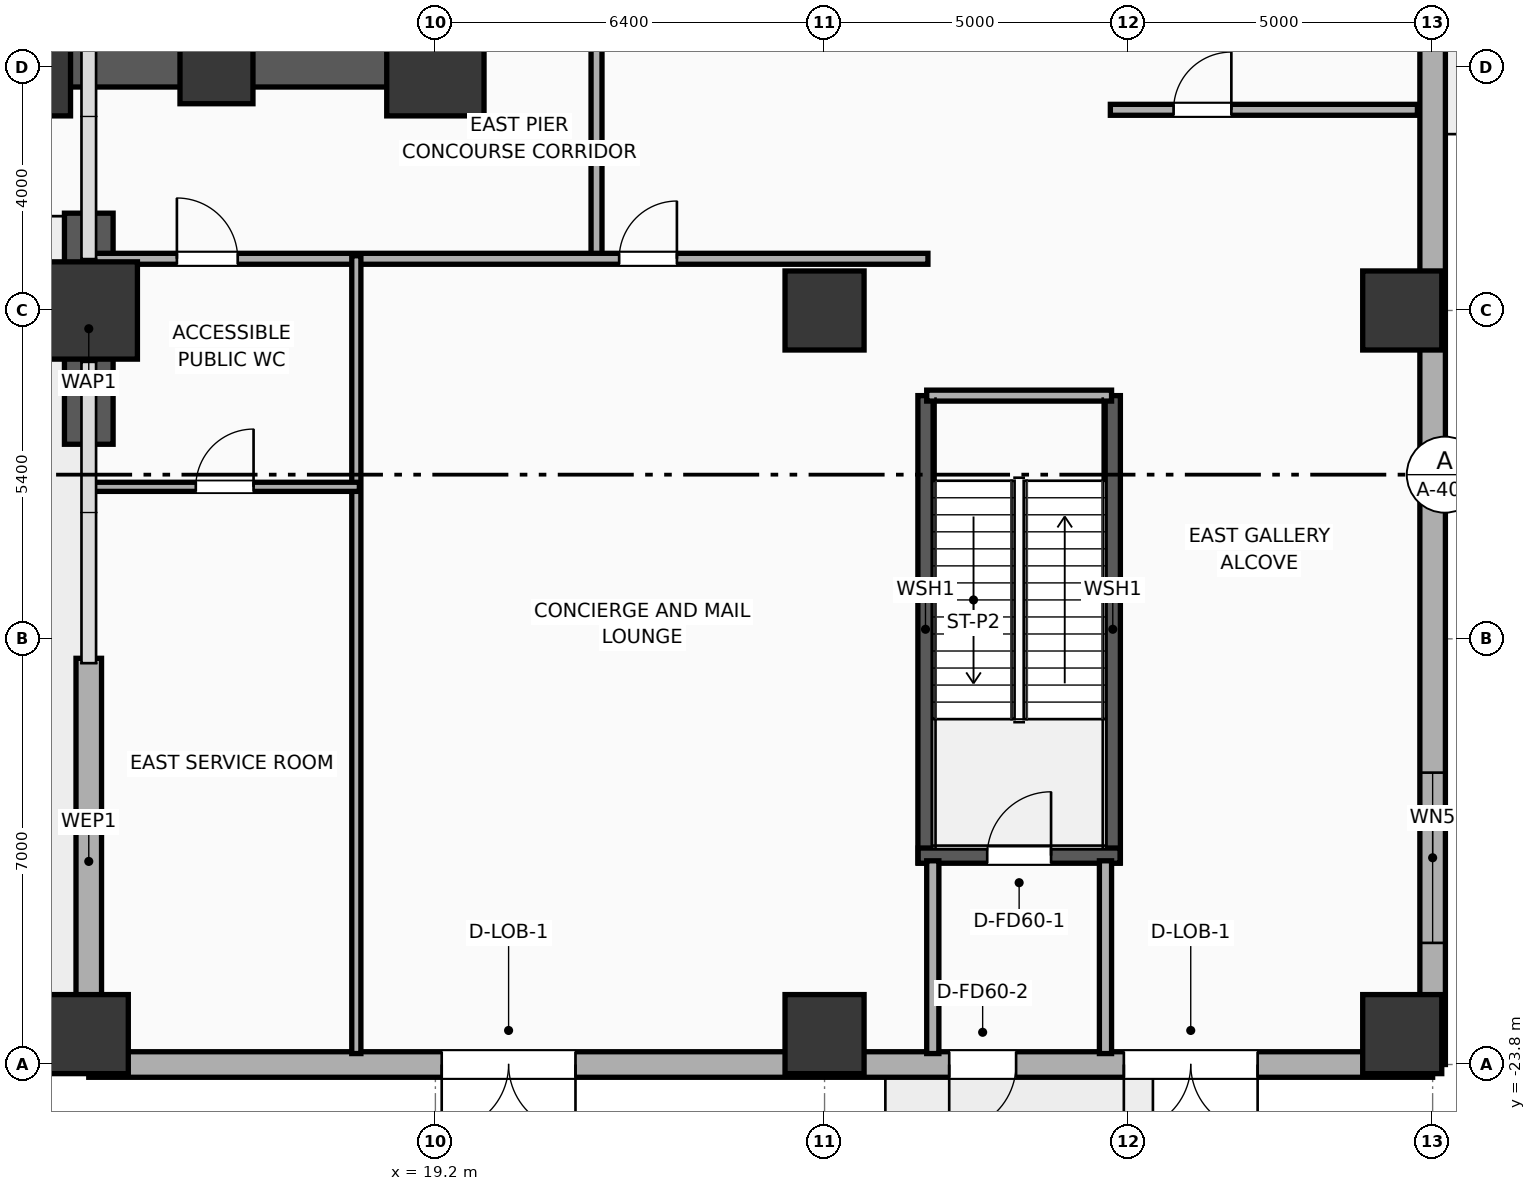
"""IFC4 building model, lengths in metres.
Left out: names, types, materials, properties, quantities, classifications, styles, units other than length and angle.
Written with IfcOpenShell. Run it as: python <this file> out.ifc"""

import sys

from ifc_helpers import new_model, si_unit, direction, frame, frame_2d, origin, origin_2d, place, context, subcontext, project, spatial, rectangle, extrude, element, fill, save


model = new_model("IFC4")
c1 = context("Model", 3, precision=1e-05, world=origin(), true_north=direction((0.0, 1.0)))
c2 = subcontext(c1, "Body", "Model", "MODEL_VIEW")
j1 = project(units=[si_unit("LENGTHUNIT", "METRE"), si_unit("PLANEANGLEUNIT", "RADIAN")], contexts=[c1])
p1 = place(None, origin())
s1 = spatial("IfcSite", under=j1, at=p1, CompositionType="ELEMENT")
p2 = place(p1, origin())
s2 = spatial("IfcBuilding", under=s1, at=p2, CompositionType="ELEMENT")
p3 = place(p2, origin())
s3 = spatial("IfcBuildingStorey", under=s2, at=p3, CompositionType="ELEMENT", Elevation=0.0)
p4 = place(p3, frame((12.4, -7.4, 0.0), z_axis=(0.0, 0.0, 1.0), x_axis=(1.0, 0.0, 0.0)))
e1 = element("IfcColumn", 1, at=p4, inside=s3, PredefinedType="COLUMN", context=c2, shape_type="SweptSolid", body=[
    extrude(rectangle(XDim=1.6, YDim=1.6, at=origin_2d()), origin(), (0.0, 0.0, 1.0), 5.2),
])
p5 = place(p3, frame((15.6, -7.4, 0.0), z_axis=(0.0, 0.0, 1.0), x_axis=(1.0, 0.0, 0.0)))
e2 = element("IfcColumn", 2, at=p5, inside=s3, PredefinedType="COLUMN", context=c2, shape_type="SweptSolid", body=[
    extrude(rectangle(XDim=1.2, YDim=1.2, at=origin_2d()), origin(), (0.0, 0.0, 1.0), 5.2),
])
p6 = place(p3, frame((19.2, -7.4, 0.0), z_axis=(0.0, 0.0, 1.0), x_axis=(1.0, 0.0, 0.0)))
e3 = element("IfcColumn", 3, at=p6, inside=s3, PredefinedType="COLUMN", context=c2, shape_type="SweptSolid", body=[
    extrude(rectangle(XDim=1.6, YDim=1.6, at=origin_2d()), origin(), (0.0, 0.0, 1.0), 5.2),
])
p7 = place(p3, frame((12.075, -7.4, 0.0), z_axis=(0.0, 0.0, 1.0), x_axis=(1.0, 0.0, 0.0)))
e4 = element("IfcWall", 4, at=p7, inside=s3, PredefinedType="SHEAR", context=c2, shape_type="SweptSolid", body=[
    extrude(rectangle(XDim=7.45, YDim=0.65, at=frame_2d((3.725, 0.0))), origin(), (0.0, 0.0, 1.0), 4.92),
])
p8 = place(p3, frame((19.145, -7.4, 0.0), z_axis=(0.0, 0.0, 1.0), x_axis=(0.0, 1.0, 0.0)))
e5 = element("IfcWall", 5, at=p8, inside=s3, PredefinedType="SHEAR", context=c2, shape_type="SweptSolid", body=[
    extrude(rectangle(XDim=14.8, YDim=0.65, at=frame_2d((7.4, 0.0))), origin(), (0.0, 0.0, 1.0), 4.92),
])
for number, where, z_axis, x_axis in (
    (6, (27.26, -20.485, 0.0), (0.0, 0.0, 1.0), (0.0, 1.0, 0.0)),
    (7, (30.34, -20.485, 0.0), (0.0, 0.0, 1.0), (0.0, 1.0, 0.0)),
):
    element("IfcWall", number, at=place(p3, frame(where, z_axis=z_axis, x_axis=x_axis)), inside=s3, PredefinedType="SOLIDWALL", context=c2, shape_type="SweptSolid", body=[
        extrude(rectangle(XDim=7.685, YDim=0.25, at=frame_2d((3.843, 0.0))), origin(), (0.0, 0.0, 1.0), 4.92),
    ])
p9 = place(p3, frame((27.14, -20.365, 0.0), z_axis=(0.0, 0.0, 1.0), x_axis=(1.0, 0.0, 0.0)))
e8 = element("IfcWall", 8, at=p9, inside=s3, PredefinedType="SOLIDWALL", context=c2, shape_type="SweptSolid", body=[
    extrude(rectangle(XDim=3.32, YDim=0.25, at=frame_2d((1.66, 0.0))), origin(), (0.0, 0.0, 1.0), 4.92),
])
p10 = place(p9, frame((1.135, 0.0, 0.0)))
e9 = element("IfcOpeningElement", 9, at=p10, cuts=e8, PredefinedType="OPENING", context=c2, shape_type="SweptSolid", body=[
    extrude(rectangle(XDim=1.05, YDim=2.05, at=frame_2d((0.525, 1.025))), frame((0.0, 0.135, 0.0), z_axis=(0.0, -1.0, 0.0), x_axis=(1.0, 0.0, 0.0)), (0.0, 0.0, 1.0), 0.27),
])
p11 = place(p3, frame((13.5, -23.3, 0.0), z_axis=(0.0, 0.0, 1.0), x_axis=(1.0, 0.0, 0.0)))
e10 = element("IfcColumn", 10, at=p11, inside=s3, PredefinedType="COLUMN", context=c2, shape_type="SweptSolid", body=[
    extrude(rectangle(XDim=1.3, YDim=1.3, at=origin_2d()), origin(), (0.0, 0.0, 1.0), 5.2),
])
p12 = place(p3, frame((13.5, -11.4, 0.0), z_axis=(0.0, 0.0, 1.0), x_axis=(1.0, 0.0, 0.0)))
e11 = element("IfcColumn", 11, at=p12, inside=s3, PredefinedType="COLUMN", context=c2, shape_type="SweptSolid", body=[
    extrude(rectangle(XDim=1.6, YDim=1.6, at=origin_2d()), origin(), (0.0, 0.0, 1.0), 5.2),
])
for number, where, z_axis, x_axis in (
    (12, (25.6, -23.3, 0.0), (0.0, 0.0, 1.0), (1.0, 0.0, 0.0)),
    (13, (25.6, -11.4, 0.0), (0.0, 0.0, 1.0), (1.0, 0.0, 0.0)),
    (14, (35.1, -23.3, 0.0), (0.0, 0.0, 1.0), (1.0, 0.0, 0.0)),
    (15, (35.1, -11.4, 0.0), (0.0, 0.0, 1.0), (1.0, 0.0, 0.0)),
):
    element("IfcColumn", number, at=place(p3, frame(where, z_axis=z_axis, x_axis=x_axis)), inside=s3, PredefinedType="COLUMN", context=c2, shape_type="SweptSolid", body=[
        extrude(rectangle(XDim=1.3, YDim=1.3, at=origin_2d()), origin(), (0.0, 0.0, 1.0), 5.2),
    ])
p13 = place(p3, frame((13.5, -13.6, 0.0), z_axis=(0.0, 0.0, 1.0), x_axis=(0.0, 1.0, 0.0)))
e16 = element("IfcWall", 16, at=p13, inside=s3, PredefinedType="SOLIDWALL", context=c2, shape_type="SweptSolid", body=[
    extrude(rectangle(XDim=3.8, YDim=0.8, at=frame_2d((1.9, 0.0))), origin(), (0.0, 0.0, 1.0), 4.92),
])
p14 = place(p3, frame((35.6, -23.8, 0.0), z_axis=(0.0, 0.0, 1.0), x_axis=(-1.0, 0.0, 0.0)))
e17 = element("IfcWall", 17, at=p14, inside=s3, PredefinedType="ELEMENTEDWALL", context=c2, shape_type="SweptSolid", body=[
    extrude(rectangle(XDim=22.1, YDim=0.42, at=frame_2d((11.05, 0.0))), origin(), (0.0, 0.0, 1.0), 4.92),
])
p15 = place(p14, frame((6.85, 0.0, 0.0)))
e18 = element("IfcOpeningElement", 18, at=p15, cuts=e17, PredefinedType="OPENING", context=c2, shape_type="SweptSolid", body=[
    extrude(rectangle(XDim=1.1, YDim=2.05, at=frame_2d((0.55, 1.025))), frame((0.0, 0.22, 0.0), z_axis=(0.0, -1.0, 0.0), x_axis=(1.0, 0.0, 0.0)), (0.0, 0.0, 1.0), 0.44),
])
p16 = place(p14, frame((2.878, 0.0, 0.0)))
e19 = element("IfcOpeningElement", 19, at=p16, cuts=e17, PredefinedType="OPENING", context=c2, shape_type="SweptSolid", body=[
    extrude(rectangle(XDim=2.2, YDim=2.4, at=frame_2d((1.1, 1.2))), frame((0.0, 0.22, 0.0), z_axis=(0.0, -1.0, 0.0), x_axis=(1.0, 0.0, 0.0)), (0.0, 0.0, 1.0), 0.44),
])
p17 = place(p14, frame((14.096, 0.0, 0.0)))
e20 = element("IfcOpeningElement", 20, at=p17, cuts=e17, PredefinedType="OPENING", context=c2, shape_type="SweptSolid", body=[
    extrude(rectangle(XDim=2.2, YDim=2.4, at=frame_2d((1.1, 1.2))), frame((0.0, 0.22, 0.0), z_axis=(0.0, -1.0, 0.0), x_axis=(1.0, 0.0, 0.0)), (0.0, 0.0, 1.0), 0.44),
])
p18 = place(p3, frame((35.6, -23.8, 0.0), z_axis=(0.0, 0.0, 1.0), x_axis=(0.0, 1.0, 0.0)))
e21 = element("IfcWall", 21, at=p18, inside=s3, PredefinedType="ELEMENTEDWALL", context=c2, shape_type="SweptSolid", body=[
    extrude(rectangle(XDim=47.6, YDim=0.42, at=frame_2d((23.8, 0.0))), origin(), (0.0, 0.0, 1.0), 4.92),
])
p19 = place(p18, frame((2.0, 0.0, 0.65)))
e22 = element("IfcOpeningElement", 22, at=p19, cuts=e21, PredefinedType="OPENING", context=c2, shape_type="SweptSolid", body=[
    extrude(rectangle(XDim=2.8, YDim=2.6, at=frame_2d((1.4, 1.3))), frame((0.0, 0.22, 0.0), z_axis=(0.0, -1.0, 0.0), x_axis=(1.0, 0.0, 0.0)), (0.0, 0.0, 1.0), 0.44),
])
p20 = place(p18, frame((29.2, 0.0, 0.65)))
e23 = element("IfcOpeningElement", 23, at=p20, cuts=e21, PredefinedType="OPENING", context=c2, shape_type="SweptSolid", body=[
    extrude(rectangle(XDim=2.8, YDim=2.6, at=frame_2d((1.4, 1.3))), frame((0.0, 0.22, 0.0), z_axis=(0.0, -1.0, 0.0), x_axis=(1.0, 0.0, 0.0)), (0.0, 0.0, 1.0), 0.44),
])
p21 = place(p18, frame((42.8, 0.0, 0.65)))
e24 = element("IfcOpeningElement", 24, at=p21, cuts=e21, PredefinedType="OPENING", context=c2, shape_type="SweptSolid", body=[
    extrude(rectangle(XDim=2.8, YDim=2.6, at=frame_2d((1.4, 1.3))), frame((0.0, 0.22, 0.0), z_axis=(0.0, -1.0, 0.0), x_axis=(1.0, 0.0, 0.0)), (0.0, 0.0, 1.0), 0.44),
])
p22 = place(p3, frame((13.5, -23.8, 0.0), z_axis=(0.0, 0.0, 1.0), x_axis=(0.0, 1.0, 0.0)))
e25 = element("IfcWall", 25, at=p22, inside=s3, PredefinedType="ELEMENTEDWALL", context=c2, shape_type="SweptSolid", body=[
    extrude(rectangle(XDim=6.68, YDim=0.42, at=frame_2d((3.34, 0.0))), origin(), (0.0, 0.0, 1.0), 4.21),
])
p23 = place(p3, frame((15.4, -7.4, 0.0), z_axis=(0.0, 0.0, 1.0), x_axis=(0.0, 1.0, 0.0)))
e26 = element("IfcWall", 26, at=p23, inside=s3, PredefinedType="SOLIDWALL", context=c2, shape_type="SweptSolid", body=[
    extrude(rectangle(XDim=2.6, YDim=0.25, at=frame_2d((1.3, 0.0))), origin(), (0.0, 0.0, 1.0), 4.92),
])
for number, where, z_axis, x_axis in (
    (27, (27.38, -23.62, 0.0), (0.0, 0.0, 1.0), (0.0, 1.0, 0.0)),
    (28, (30.22, -23.62, 0.0), (0.0, 0.0, 1.0), (0.0, 1.0, 0.0)),
):
    element("IfcWall", number, at=place(p3, frame(where, z_axis=z_axis, x_axis=x_axis)), inside=s3, PredefinedType="PARTITIONING", context=c2, shape_type="SweptSolid", body=[
        extrude(rectangle(XDim=3.17, YDim=0.2, at=frame_2d((1.585, 0.0))), origin(), (0.0, 0.0, 1.0), 4.92),
    ])
p24 = place(p3, frame((27.28, -12.8, 0.0), z_axis=(0.0, 0.0, 1.0), x_axis=(1.0, 0.0, 0.0)))
e29 = element("IfcWall", 29, at=p24, inside=s3, PredefinedType="PARTITIONING", context=c2, shape_type="SweptSolid", body=[
    extrude(rectangle(XDim=3.04, YDim=0.18, at=frame_2d((1.52, 0.0))), origin(), (0.0, 0.0, 1.0), 4.92),
])
p25 = place(p3, frame((21.85, -10.5, 0.0), z_axis=(0.0, 0.0, 1.0), x_axis=(0.0, 1.0, 0.0)))
e30 = element("IfcWall", 30, at=p25, inside=s3, PredefinedType="PARTITIONING", context=c2, shape_type="SweptSolid", body=[
    extrude(rectangle(XDim=34.12, YDim=0.18, at=frame_2d((17.06, 0.0))), origin(), (0.0, 0.0, 1.0), 4.92),
])
p26 = place(p25, frame((13.531, 0.0, 0.0)))
e31 = element("IfcOpeningElement", 31, at=p26, cuts=e30, PredefinedType="OPENING", context=c2, shape_type="SweptSolid", body=[
    extrude(rectangle(XDim=1.6, YDim=2.05, at=frame_2d((0.8, 1.025))), frame((0.0, 0.1, 0.0), z_axis=(0.0, -1.0, 0.0), x_axis=(1.0, 0.0, 0.0)), (0.0, 0.0, 1.0), 0.2),
])
p27 = place(p3, frame((30.3, -8.1, 0.0), z_axis=(0.0, 0.0, 1.0), x_axis=(1.0, 0.0, 0.0)))
e32 = element("IfcWall", 32, at=p27, inside=s3, PredefinedType="PARTITIONING", context=c2, shape_type="SweptSolid", body=[
    extrude(rectangle(XDim=5.05, YDim=0.18, at=frame_2d((2.525, 0.0))), origin(), (0.0, 0.0, 1.0), 4.92),
])
p28 = place(p27, frame((1.04, 0.0, 0.0)))
e33 = element("IfcOpeningElement", 33, at=p28, cuts=e32, PredefinedType="OPENING", context=c2, shape_type="SweptSolid", body=[
    extrude(rectangle(XDim=0.95, YDim=2.05, at=frame_2d((0.475, 1.025))), frame((0.0, 0.1, 0.0), z_axis=(0.0, -1.0, 0.0), x_axis=(1.0, 0.0, 0.0)), (0.0, 0.0, 1.0), 0.2),
])
p29 = place(p3, frame((13.52, -10.55, 0.0), z_axis=(0.0, 0.0, 1.0), x_axis=(1.0, 0.0, 0.0)))
e34 = element("IfcWall", 34, at=p29, inside=s3, PredefinedType="PARTITIONING", context=c2, shape_type="SweptSolid", body=[
    extrude(rectangle(XDim=13.78, YDim=0.18, at=frame_2d((6.89, 0.0))), origin(), (0.0, 0.0, 1.0), 4.92),
])
p30 = place(p29, frame((1.429, 0.0, 0.0)))
e35 = element("IfcOpeningElement", 35, at=p30, cuts=e34, PredefinedType="OPENING", context=c2, shape_type="SweptSolid", body=[
    extrude(rectangle(XDim=1.0, YDim=2.05, at=frame_2d((0.5, 1.025))), frame((0.0, 0.1, 0.0), z_axis=(0.0, -1.0, 0.0), x_axis=(1.0, 0.0, 0.0)), (0.0, 0.0, 1.0), 0.2),
])
p31 = place(p29, frame((8.702, 0.0, 0.0)))
e36 = element("IfcOpeningElement", 36, at=p31, cuts=e34, PredefinedType="OPENING", context=c2, shape_type="SweptSolid", body=[
    extrude(rectangle(XDim=0.95, YDim=2.05, at=frame_2d((0.475, 1.025))), frame((0.0, 0.1, 0.0), z_axis=(0.0, -1.0, 0.0), x_axis=(1.0, 0.0, 0.0)), (0.0, 0.0, 1.0), 0.2),
])
p32 = place(p3, frame((17.9, -23.62, 0.0), z_axis=(0.0, 0.0, 1.0), x_axis=(0.0, 1.0, 0.0)))
e37 = element("IfcWall", 37, at=p32, inside=s3, PredefinedType="PLUMBINGWALL", context=c2, shape_type="SweptSolid", body=[
    extrude(rectangle(XDim=13.12, YDim=0.15, at=frame_2d((6.56, 0.0))), origin(), (0.0, 0.0, 1.0), 4.92),
])
p33 = place(p3, frame((13.52, -14.3, 0.0), z_axis=(0.0, 0.0, 1.0), x_axis=(1.0, 0.0, 0.0)))
e38 = element("IfcWall", 38, at=p33, inside=s3, PredefinedType="PLUMBINGWALL", context=c2, shape_type="SweptSolid", body=[
    extrude(rectangle(XDim=4.43, YDim=0.15, at=frame_2d((2.215, 0.0))), origin(), (0.0, 0.0, 1.0), 4.92),
])
p34 = place(p33, frame((1.74, 0.0, 0.0)))
e39 = element("IfcOpeningElement", 39, at=p34, cuts=e38, PredefinedType="OPENING", context=c2, shape_type="SweptSolid", body=[
    extrude(rectangle(XDim=0.95, YDim=2.05, at=frame_2d((0.475, 1.025))), frame((0.0, 0.085, 0.0), z_axis=(0.0, -1.0, 0.0), x_axis=(1.0, 0.0, 0.0)), (0.0, 0.0, 1.0), 0.17),
])
p35 = place(p15, origin())
e40 = element("IfcDoor", 40, at=p35, inside=s3, OperationType="SINGLE_SWING_RIGHT", PredefinedType="DOOR", context=c2, shape_type="SweptSolid", body=[
    extrude(rectangle(XDim=1.1, YDim=2.05, at=frame_2d((0.55, 1.025))), frame((0.0, 0.025, 0.0), z_axis=(0.0, -1.0, 0.0), x_axis=(1.0, 0.0, 0.0)), (0.0, 0.0, 1.0), 0.05),
])
fill(e18, e40)
p36 = place(p16, origin())
e41 = element("IfcDoor", 41, at=p36, inside=s3, OperationType="DOUBLE_DOOR_SINGLE_SWING", PredefinedType="DOOR", context=c2, shape_type="SweptSolid", body=[
    extrude(rectangle(XDim=2.2, YDim=2.4, at=frame_2d((1.1, 1.2))), frame((0.0, 0.025, 0.0), z_axis=(0.0, -1.0, 0.0), x_axis=(1.0, 0.0, 0.0)), (0.0, 0.0, 1.0), 0.05),
])
fill(e19, e41)
p37 = place(p17, origin())
e42 = element("IfcDoor", 42, at=p37, inside=s3, OperationType="DOUBLE_DOOR_SINGLE_SWING", PredefinedType="DOOR", context=c2, shape_type="SweptSolid", body=[
    extrude(rectangle(XDim=2.2, YDim=2.4, at=frame_2d((1.1, 1.2))), frame((0.0, 0.025, 0.0), z_axis=(0.0, -1.0, 0.0), x_axis=(1.0, 0.0, 0.0)), (0.0, 0.0, 1.0), 0.05),
])
fill(e20, e42)
p38 = place(p19, origin())
e43 = element("IfcWindow", 43, at=p38, inside=s3, PartitioningType="SINGLE_PANEL", PredefinedType="WINDOW", context=c2, shape_type="SweptSolid", body=[
    extrude(rectangle(XDim=2.8, YDim=2.6, at=frame_2d((1.4, 1.3))), frame((0.0, 0.03, 0.0), z_axis=(0.0, -1.0, 0.0), x_axis=(1.0, 0.0, 0.0)), (0.0, 0.0, 1.0), 0.06),
])
fill(e22, e43)
p39 = place(p28, origin())
e44 = element("IfcDoor", 44, at=p39, inside=s3, OperationType="SINGLE_SWING_RIGHT", PredefinedType="DOOR", context=c2, shape_type="SweptSolid", body=[
    extrude(rectangle(XDim=0.95, YDim=2.05, at=frame_2d((0.475, 1.025))), frame((0.0, 0.025, 0.0), z_axis=(0.0, -1.0, 0.0), x_axis=(1.0, 0.0, 0.0)), (0.0, 0.0, 1.0), 0.05),
])
fill(e33, e44)
p40 = place(p30, origin())
e45 = element("IfcDoor", 45, at=p40, inside=s3, OperationType="SINGLE_SWING_LEFT", PredefinedType="DOOR", context=c2, shape_type="SweptSolid", body=[
    extrude(rectangle(XDim=1.0, YDim=2.05, at=frame_2d((0.5, 1.025))), frame((0.0, 0.025, 0.0), z_axis=(0.0, -1.0, 0.0), x_axis=(1.0, 0.0, 0.0)), (0.0, 0.0, 1.0), 0.05),
])
fill(e35, e45)
p41 = place(p31, origin())
e46 = element("IfcDoor", 46, at=p41, inside=s3, OperationType="SINGLE_SWING_RIGHT", PredefinedType="DOOR", context=c2, shape_type="SweptSolid", body=[
    extrude(rectangle(XDim=0.95, YDim=2.05, at=frame_2d((0.475, 1.025))), frame((0.0, 0.025, 0.0), z_axis=(0.0, -1.0, 0.0), x_axis=(1.0, 0.0, 0.0)), (0.0, 0.0, 1.0), 0.05),
])
fill(e36, e46)
p42 = place(p34, origin())
e47 = element("IfcDoor", 47, at=p42, inside=s3, OperationType="SINGLE_SWING_RIGHT", PredefinedType="DOOR", context=c2, shape_type="SweptSolid", body=[
    extrude(rectangle(XDim=0.95, YDim=2.05, at=frame_2d((0.475, 1.025))), frame((0.0, 0.025, 0.0), z_axis=(0.0, -1.0, 0.0), x_axis=(1.0, 0.0, 0.0)), (0.0, 0.0, 1.0), 0.05),
])
fill(e39, e47)
p43 = place(p10, origin())
e48 = element("IfcDoor", 48, at=p43, inside=s3, OperationType="SINGLE_SWING_RIGHT", PredefinedType="DOOR", context=c2, shape_type="SweptSolid", body=[
    extrude(rectangle(XDim=1.05, YDim=2.05, at=frame_2d((0.525, 1.025))), frame((0.0, 0.025, 0.0), z_axis=(0.0, -1.0, 0.0), x_axis=(1.0, 0.0, 0.0)), (0.0, 0.0, 1.0), 0.05),
])
fill(e9, e48)
save(model, sys.argv[1])
